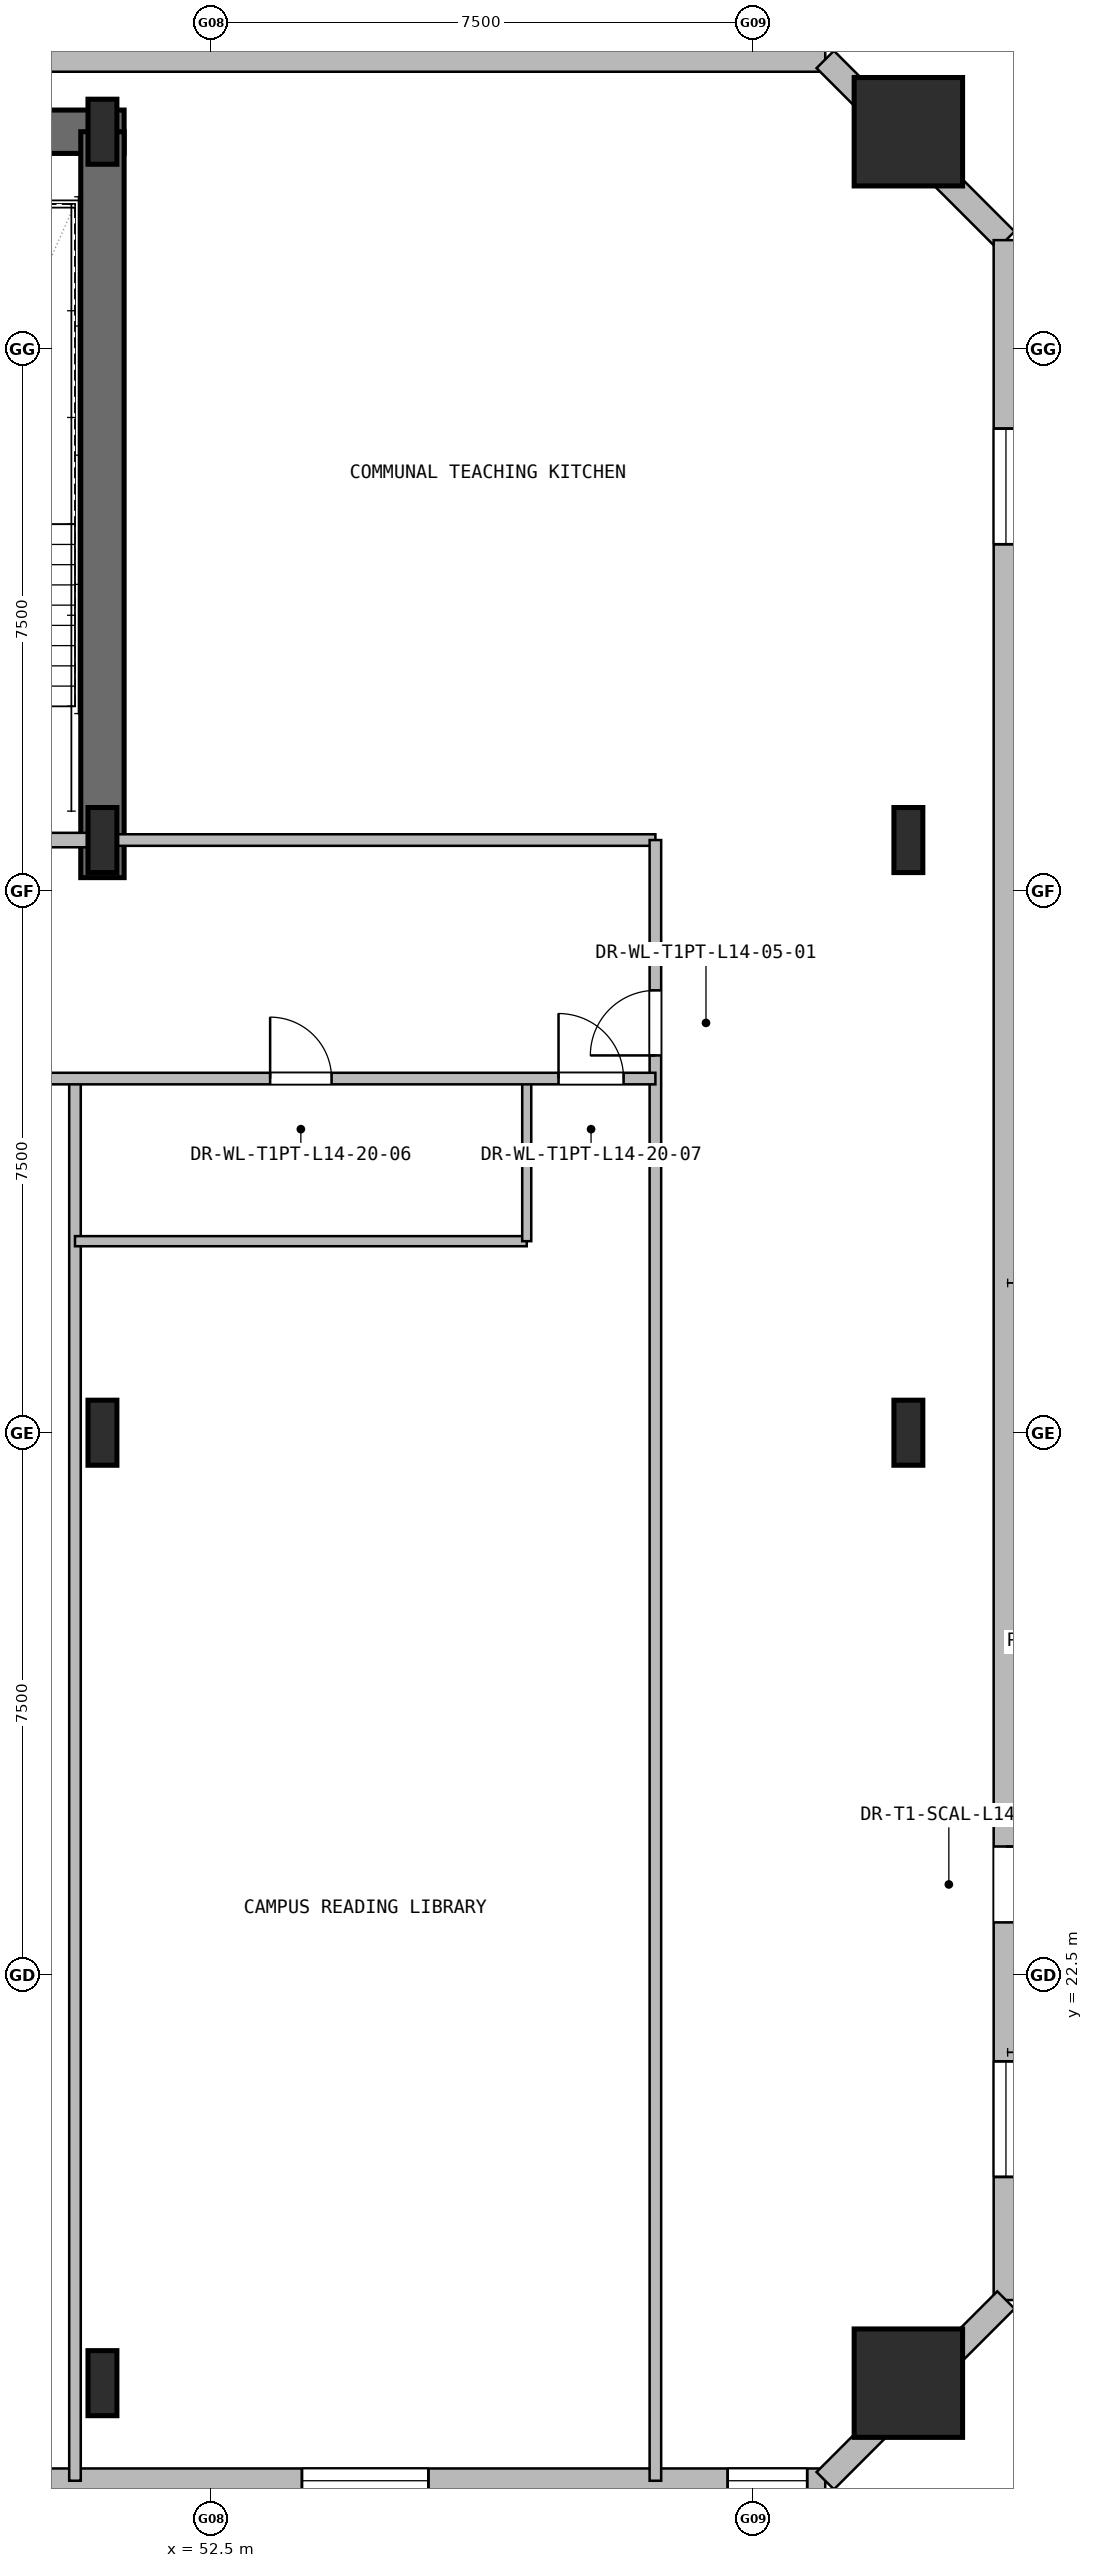
"""IFC4 building model, lengths in metres.
Left out: names, types, materials, properties, quantities, classifications, styles, units other than length and angle.
Written with IfcOpenShell. Run it as: python <this file> out.ifc"""

import sys

from ifc_helpers import new_model, si_unit, direction, frame, frame_2d, origin, origin_2d, place, context, subcontext, project, spatial, rectangle, hollow_rectangle, i_section, extrude, element, fill, save


model = new_model("IFC4")
c1 = context("Model", 3, precision=1e-05, world=origin(), true_north=direction((0.0, 1.0)))
c2 = subcontext(c1, "Body", "Model", "MODEL_VIEW")
j1 = project(units=[si_unit("LENGTHUNIT", "METRE"), si_unit("PLANEANGLEUNIT", "RADIAN")], contexts=[c1])
p1 = place(None, origin())
s1 = spatial("IfcSite", under=j1, at=p1, CompositionType="ELEMENT")
p2 = place(p1, origin())
s2 = spatial("IfcBuilding", under=s1, at=p2, CompositionType="ELEMENT")
p3 = place(p2, frame((0.0, 0.0, 57.0)))
s3 = spatial("IfcBuildingStorey", under=s2, at=p3, CompositionType="ELEMENT", Elevation=57.0)
p4 = place(p3, frame((23.7, 48.0, 0.0), z_axis=(0.0, 0.0, 1.0), x_axis=(1.0, 0.0, 0.0)))
e1 = element("IfcWall", 1, at=p4, inside=s3, PredefinedType="SHEAR", context=c2, shape_type="SweptSolid", body=[
    extrude(rectangle(XDim=27.6, YDim=0.6, at=frame_2d((13.8, 0.0))), origin(), (0.0, 0.0, 1.0), 3.3),
])
p5 = place(p3, frame((51.0, 37.68, 0.0), z_axis=(0.0, 0.0, 1.0), x_axis=(0.0, 1.0, 0.0)))
e2 = element("IfcWall", 2, at=p5, inside=s3, PredefinedType="SHEAR", context=c2, shape_type="SweptSolid", body=[
    extrude(rectangle(XDim=10.32, YDim=0.6, at=frame_2d((5.16, 0.0))), origin(), (0.0, 0.0, 1.0), 3.3),
])
for number, where, z_axis, x_axis in (
    (3, (51.0, 16.85, 0.0), (0.0, 0.0, 1.0), (1.0, 0.0, 0.0)),
    (4, (51.0, 30.0, 0.0), (0.0, 0.0, 1.0), (1.0, 0.0, 0.0)),
    (5, (51.0, 38.2, 0.0), (0.0, 0.0, 1.0), (1.0, 0.0, 0.0)),
    (6, (51.0, 48.0, 0.0), (0.0, 0.0, 1.0), (1.0, 0.0, 0.0)),
):
    element("IfcColumn", number, at=place(p3, frame(where, z_axis=z_axis, x_axis=x_axis)), inside=s3, PredefinedType="COLUMN", context=c2, shape_type="SweptSolid", body=[
        extrude(i_section(OverallWidth=0.4, OverallDepth=0.9, WebThickness=0.02, FlangeThickness=0.036, at=origin_2d()), origin(), (0.0, 0.0, 1.0), 3.3),
    ])
p6 = place(p3, frame((62.15, 16.85, 0.0), z_axis=(0.0, 0.0, 1.0), x_axis=(1.0, 0.0, 0.0)))
e7 = element("IfcColumn", 7, at=p6, inside=s3, PredefinedType="COLUMN", context=c2, shape_type="SweptSolid", body=[
    extrude(hollow_rectangle(XDim=1.5, YDim=1.5, WallThickness=0.04, at=origin_2d()), origin(), (0.0, 0.0, 1.0), 3.3),
])
for number, where, z_axis, x_axis in (
    (8, (62.15, 30.0, 0.0), (0.0, 0.0, 1.0), (1.0, 0.0, 0.0)),
    (9, (62.15, 38.2, 0.0), (0.0, 0.0, 1.0), (1.0, 0.0, 0.0)),
):
    element("IfcColumn", number, at=place(p3, frame(where, z_axis=z_axis, x_axis=x_axis)), inside=s3, PredefinedType="COLUMN", context=c2, shape_type="SweptSolid", body=[
        extrude(i_section(OverallWidth=0.4, OverallDepth=0.9, WebThickness=0.02, FlangeThickness=0.036, at=origin_2d()), origin(), (0.0, 0.0, 1.0), 3.3),
    ])
p7 = place(p3, frame((62.15, 48.0, 0.0), z_axis=(0.0, 0.0, 1.0), x_axis=(1.0, 0.0, 0.0)))
e10 = element("IfcColumn", 10, at=p7, inside=s3, PredefinedType="COLUMN", context=c2, shape_type="SweptSolid", body=[
    extrude(hollow_rectangle(XDim=1.5, YDim=1.5, WallThickness=0.04, at=origin_2d()), origin(), (0.0, 0.0, 1.0), 3.3),
])
p8 = place(p3, frame((61.0, 15.5, 0.0), z_axis=(0.0, 0.0, 1.0), x_axis=(-1.0, 0.0, 0.0)))
e11 = element("IfcWall", 11, at=p8, inside=s3, PredefinedType="SOLIDWALL", context=c2, shape_type="SweptSolid", body=[
    extrude(rectangle(XDim=47.0, YDim=0.34, at=frame_2d((23.5, 0.0))), origin(), (0.0, 0.0, 1.0), 3.03),
])
p9 = place(p8, frame((45.65, 0.0, 0.8)))
e12 = element("IfcOpeningElement", 12, at=p9, cuts=e11, PredefinedType="OPENING", context=c2, shape_type="SweptSolid", body=[
    extrude(rectangle(XDim=1.1, YDim=1.5, at=frame_2d((0.55, 0.75))), frame((0.0, 0.18, 0.0), z_axis=(0.0, -1.0, 0.0), x_axis=(1.0, 0.0, 0.0)), (0.0, 0.0, 1.0), 0.36),
])
p10 = place(p8, frame((0.25, 0.0, 0.8)))
e13 = element("IfcOpeningElement", 13, at=p10, cuts=e11, PredefinedType="OPENING", context=c2, shape_type="SweptSolid", body=[
    extrude(rectangle(XDim=1.1, YDim=1.5, at=frame_2d((0.55, 0.75))), frame((0.0, 0.18, 0.0), z_axis=(0.0, -1.0, 0.0), x_axis=(1.0, 0.0, 0.0)), (0.0, 0.0, 1.0), 0.36),
])
p11 = place(p8, frame((33.896, 0.0, 0.8)))
e14 = element("IfcOpeningElement", 14, at=p11, cuts=e11, PredefinedType="OPENING", context=c2, shape_type="SweptSolid", body=[
    extrude(rectangle(XDim=1.75, YDim=1.8, at=frame_2d((0.875, 0.9))), frame((0.0, 0.18, 0.0), z_axis=(0.0, -1.0, 0.0), x_axis=(1.0, 0.0, 0.0)), (0.0, 0.0, 1.0), 0.36),
])
p12 = place(p8, frame((12.14, 0.0, 0.8)))
e15 = element("IfcOpeningElement", 15, at=p12, cuts=e11, PredefinedType="OPENING", context=c2, shape_type="SweptSolid", body=[
    extrude(rectangle(XDim=1.75, YDim=1.8, at=frame_2d((0.875, 0.9))), frame((0.0, 0.18, 0.0), z_axis=(0.0, -1.0, 0.0), x_axis=(1.0, 0.0, 0.0)), (0.0, 0.0, 1.0), 0.36),
])
p13 = place(p8, frame((5.49, 0.0, 0.8)))
e16 = element("IfcOpeningElement", 16, at=p13, cuts=e11, PredefinedType="OPENING", context=c2, shape_type="SweptSolid", body=[
    extrude(rectangle(XDim=1.75, YDim=1.8, at=frame_2d((0.875, 0.9))), frame((0.0, 0.18, 0.0), z_axis=(0.0, -1.0, 0.0), x_axis=(1.0, 0.0, 0.0)), (0.0, 0.0, 1.0), 0.36),
])
p14 = place(p3, frame((14.0, 49.0, 0.0), z_axis=(0.0, 0.0, 1.0), x_axis=(1.0, 0.0, 0.0)))
e17 = element("IfcWall", 17, at=p14, inside=s3, PredefinedType="SOLIDWALL", context=c2, shape_type="SweptSolid", body=[
    extrude(rectangle(XDim=47.0, YDim=0.34, at=frame_2d((23.5, 0.0))), origin(), (0.0, 0.0, 1.0), 3.03),
])
p15 = place(p3, frame((61.0, 49.0, 0.0), z_axis=(0.0, 0.0, 1.0), x_axis=(0.707106781187, -0.707106781187, 0.0)))
e18 = element("IfcWall", 18, at=p15, inside=s3, PredefinedType="SOLIDWALL", context=c2, shape_type="SweptSolid", body=[
    extrude(rectangle(XDim=3.536, YDim=0.34, at=frame_2d((1.768, 0.0))), origin(), (0.0, 0.0, 1.0), 3.03),
])
p16 = place(p3, frame((63.5, 46.5, 0.0), z_axis=(0.0, 0.0, 1.0), x_axis=(0.0, -1.0, 0.0)))
e19 = element("IfcWall", 19, at=p16, inside=s3, PredefinedType="SOLIDWALL", context=c2, shape_type="SweptSolid", body=[
    extrude(rectangle(XDim=28.5, YDim=0.34, at=frame_2d((14.25, 0.0))), origin(), (0.0, 0.0, 1.0), 3.03),
])
p17 = place(p16, frame((22.225, 0.0, 0.0)))
e20 = element("IfcOpeningElement", 20, at=p17, cuts=e19, PredefinedType="OPENING", context=c2, shape_type="SweptSolid", body=[
    extrude(rectangle(XDim=1.05, YDim=2.1, at=frame_2d((0.525, 1.05))), frame((0.0, 0.18, 0.0), z_axis=(0.0, -1.0, 0.0), x_axis=(1.0, 0.0, 0.0)), (0.0, 0.0, 1.0), 0.36),
])
p18 = place(p16, frame((2.607, 0.0, 0.8)))
e21 = element("IfcOpeningElement", 21, at=p18, cuts=e19, PredefinedType="OPENING", context=c2, shape_type="SweptSolid", body=[
    extrude(rectangle(XDim=1.6, YDim=1.8, at=frame_2d((0.8, 0.9))), frame((0.0, 0.18, 0.0), z_axis=(0.0, -1.0, 0.0), x_axis=(1.0, 0.0, 0.0)), (0.0, 0.0, 1.0), 0.36),
])
p19 = place(p16, frame((25.196, 0.0, 0.8)))
e22 = element("IfcOpeningElement", 22, at=p19, cuts=e19, PredefinedType="OPENING", context=c2, shape_type="SweptSolid", body=[
    extrude(rectangle(XDim=1.6, YDim=1.8, at=frame_2d((0.8, 0.9))), frame((0.0, 0.18, 0.0), z_axis=(0.0, -1.0, 0.0), x_axis=(1.0, 0.0, 0.0)), (0.0, 0.0, 1.0), 0.36),
])
p20 = place(p3, frame((63.5, 18.0, 0.0), z_axis=(0.0, 0.0, 1.0), x_axis=(-0.707106781187, -0.707106781187, 0.0)))
e23 = element("IfcWall", 23, at=p20, inside=s3, PredefinedType="SOLIDWALL", context=c2, shape_type="SweptSolid", body=[
    extrude(rectangle(XDim=3.536, YDim=0.34, at=frame_2d((1.768, 0.0))), origin(), (0.0, 0.0, 1.0), 3.03),
])
p21 = place(p3, frame((47.15, 38.2, 0.0), z_axis=(0.0, 0.0, 1.0), x_axis=(1.0, 0.0, 0.0)))
e24 = element("IfcWall", 24, at=p21, inside=s3, PredefinedType="PARTITIONING", context=c2, shape_type="SweptSolid", body=[
    extrude(rectangle(XDim=3.85, YDim=0.2, at=frame_2d((1.925, 0.0))), origin(), (0.0, 0.0, 1.0), 2.33),
])
p22 = place(p21, frame((0.75, 0.0, 0.0)))
e25 = element("IfcOpeningElement", 25, at=p22, cuts=e24, PredefinedType="OPENING", context=c2, shape_type="SweptSolid", body=[
    extrude(rectangle(XDim=1.12, YDim=2.1, at=frame_2d((0.56, 1.05))), frame((0.0, 0.11, 0.0), z_axis=(0.0, -1.0, 0.0), x_axis=(1.0, 0.0, 0.0)), (0.0, 0.0, 1.0), 0.22),
])
p23 = place(p3, frame((51.0, 38.2, 0.0), z_axis=(0.0, 0.0, 1.0), x_axis=(1.0, 0.0, 0.0)))
e26 = element("IfcWall", 26, at=p23, inside=s3, PredefinedType="PARTITIONING", context=c2, shape_type="SweptSolid", body=[
    extrude(rectangle(XDim=7.65, YDim=0.16, at=frame_2d((3.825, 0.0))), origin(), (0.0, 0.0, 1.0), 2.33),
])
p24 = place(p3, frame((58.65, 15.5, 0.0), z_axis=(0.0, 0.0, 1.0), x_axis=(0.0, 1.0, 0.0)))
e27 = element("IfcWall", 27, at=p24, inside=s3, PredefinedType="PARTITIONING", context=c2, shape_type="SweptSolid", body=[
    extrude(rectangle(XDim=22.7, YDim=0.16, at=frame_2d((11.35, 0.0))), origin(), (0.0, 0.0, 1.0), 3.03),
])
p25 = place(p24, frame((19.72, 0.0, 0.0)))
e28 = element("IfcOpeningElement", 28, at=p25, cuts=e27, PredefinedType="OPENING", context=c2, shape_type="SweptSolid", body=[
    extrude(rectangle(XDim=0.9, YDim=2.05, at=frame_2d((0.45, 1.025))), frame((0.0, 0.09, 0.0), z_axis=(0.0, -1.0, 0.0), x_axis=(1.0, 0.0, 0.0)), (0.0, 0.0, 1.0), 0.18),
])
p26 = place(p3, frame((50.62, 15.5, 0.0), z_axis=(0.0, 0.0, 1.0), x_axis=(0.0, 1.0, 0.0)))
e29 = element("IfcWall", 29, at=p26, inside=s3, PredefinedType="PARTITIONING", context=c2, shape_type="SweptSolid", body=[
    extrude(rectangle(XDim=19.4, YDim=0.16, at=frame_2d((9.7, 0.0))), origin(), (0.0, 0.0, 1.0), 3.03),
])
p27 = place(p3, frame((50.62, 32.65, 0.0), z_axis=(0.0, 0.0, 1.0), x_axis=(1.0, 0.0, 0.0)))
e30 = element("IfcWall", 30, at=p27, inside=s3, PredefinedType="PARTITIONING", context=c2, shape_type="SweptSolid", body=[
    extrude(rectangle(XDim=6.25, YDim=0.14, at=frame_2d((3.125, 0.0))), origin(), (0.0, 0.0, 1.0), 3.03),
])
p28 = place(p3, frame((56.87, 32.65, 0.0), z_axis=(0.0, 0.0, 1.0), x_axis=(0.0, 1.0, 0.0)))
e31 = element("IfcWall", 31, at=p28, inside=s3, PredefinedType="PARTITIONING", context=c2, shape_type="SweptSolid", body=[
    extrude(rectangle(XDim=2.25, YDim=0.125, at=frame_2d((1.125, 0.0))), origin(), (0.0, 0.0, 1.0), 3.03),
])
p29 = place(p3, frame((18.5, 34.9, 0.0), z_axis=(0.0, 0.0, 1.0), x_axis=(1.0, 0.0, 0.0)))
e32 = element("IfcWall", 32, at=p29, inside=s3, PredefinedType="PARTITIONING", context=c2, shape_type="SweptSolid", body=[
    extrude(rectangle(XDim=40.15, YDim=0.16, at=frame_2d((20.075, 0.0))), origin(), (0.0, 0.0, 1.0), 3.03),
])
p30 = place(p29, frame((3.339, 0.0, 0.0)))
e33 = element("IfcOpeningElement", 33, at=p30, cuts=e32, PredefinedType="OPENING", context=c2, shape_type="SweptSolid", body=[
    extrude(rectangle(XDim=0.95, YDim=2.1, at=frame_2d((0.475, 1.05))), frame((0.0, 0.09, 0.0), z_axis=(0.0, -1.0, 0.0), x_axis=(1.0, 0.0, 0.0)), (0.0, 0.0, 1.0), 0.18),
])
p31 = place(p29, frame((11.193, 0.0, 0.0)))
e34 = element("IfcOpeningElement", 34, at=p31, cuts=e32, PredefinedType="OPENING", context=c2, shape_type="SweptSolid", body=[
    extrude(rectangle(XDim=0.9, YDim=2.05, at=frame_2d((0.45, 1.025))), frame((0.0, 0.09, 0.0), z_axis=(0.0, -1.0, 0.0), x_axis=(1.0, 0.0, 0.0)), (0.0, 0.0, 1.0), 0.18),
])
p32 = place(p29, frame((19.424, 0.0, 0.0)))
e35 = element("IfcOpeningElement", 35, at=p32, cuts=e32, PredefinedType="OPENING", context=c2, shape_type="SweptSolid", body=[
    extrude(rectangle(XDim=0.9, YDim=2.05, at=frame_2d((0.45, 1.025))), frame((0.0, 0.09, 0.0), z_axis=(0.0, -1.0, 0.0), x_axis=(1.0, 0.0, 0.0)), (0.0, 0.0, 1.0), 0.18),
])
p33 = place(p29, frame((24.89, 0.0, 0.0)))
e36 = element("IfcOpeningElement", 36, at=p33, cuts=e32, PredefinedType="OPENING", context=c2, shape_type="SweptSolid", body=[
    extrude(rectangle(XDim=0.85, YDim=2.05, at=frame_2d((0.425, 1.025))), frame((0.0, 0.09, 0.0), z_axis=(0.0, -1.0, 0.0), x_axis=(1.0, 0.0, 0.0)), (0.0, 0.0, 1.0), 0.18),
])
p34 = place(p29, frame((28.88, 0.0, 0.0)))
e37 = element("IfcOpeningElement", 37, at=p34, cuts=e32, PredefinedType="OPENING", context=c2, shape_type="SweptSolid", body=[
    extrude(rectangle(XDim=0.9, YDim=2.05, at=frame_2d((0.45, 1.025))), frame((0.0, 0.09, 0.0), z_axis=(0.0, -1.0, 0.0), x_axis=(1.0, 0.0, 0.0)), (0.0, 0.0, 1.0), 0.18),
])
p35 = place(p29, frame((34.82, 0.0, 0.0)))
e38 = element("IfcOpeningElement", 38, at=p35, cuts=e32, PredefinedType="OPENING", context=c2, shape_type="SweptSolid", body=[
    extrude(rectangle(XDim=0.85, YDim=2.05, at=frame_2d((0.425, 1.025))), frame((0.0, 0.09, 0.0), z_axis=(0.0, -1.0, 0.0), x_axis=(1.0, 0.0, 0.0)), (0.0, 0.0, 1.0), 0.18),
])
p36 = place(p29, frame((38.81, 0.0, 0.0)))
e39 = element("IfcOpeningElement", 39, at=p36, cuts=e32, PredefinedType="OPENING", context=c2, shape_type="SweptSolid", body=[
    extrude(rectangle(XDim=0.9, YDim=2.05, at=frame_2d((0.45, 1.025))), frame((0.0, 0.09, 0.0), z_axis=(0.0, -1.0, 0.0), x_axis=(1.0, 0.0, 0.0)), (0.0, 0.0, 1.0), 0.18),
])
p37 = place(p10, origin())
e40 = element("IfcWindow", 40, at=p37, inside=s3, PartitioningType="SINGLE_PANEL", PredefinedType="WINDOW", context=c2, shape_type="SweptSolid", body=[
    extrude(rectangle(XDim=1.1, YDim=1.5, at=frame_2d((0.55, 0.75))), frame((0.0, 0.03, 0.0), z_axis=(0.0, -1.0, 0.0), x_axis=(1.0, 0.0, 0.0)), (0.0, 0.0, 1.0), 0.06),
])
fill(e13, e40)
p38 = place(p13, origin())
e41 = element("IfcWindow", 41, at=p38, inside=s3, PartitioningType="SINGLE_PANEL", PredefinedType="WINDOW", context=c2, shape_type="SweptSolid", body=[
    extrude(rectangle(XDim=1.75, YDim=1.8, at=frame_2d((0.875, 0.9))), frame((0.0, 0.03, 0.0), z_axis=(0.0, -1.0, 0.0), x_axis=(1.0, 0.0, 0.0)), (0.0, 0.0, 1.0), 0.06),
])
fill(e16, e41)
p39 = place(p17, origin())
e42 = element("IfcDoor", 42, at=p39, inside=s3, OperationType="SINGLE_SWING_LEFT", PredefinedType="DOOR", context=c2, shape_type="SweptSolid", body=[
    extrude(rectangle(XDim=1.05, YDim=2.1, at=frame_2d((0.525, 1.05))), frame((0.0, 0.025, 0.0), z_axis=(0.0, -1.0, 0.0), x_axis=(1.0, 0.0, 0.0)), (0.0, 0.0, 1.0), 0.05),
])
fill(e20, e42)
p40 = place(p18, origin())
e43 = element("IfcWindow", 43, at=p40, inside=s3, PartitioningType="SINGLE_PANEL", PredefinedType="WINDOW", context=c2, shape_type="SweptSolid", body=[
    extrude(rectangle(XDim=1.6, YDim=1.8, at=frame_2d((0.8, 0.9))), frame((0.0, 0.03, 0.0), z_axis=(0.0, -1.0, 0.0), x_axis=(1.0, 0.0, 0.0)), (0.0, 0.0, 1.0), 0.06),
])
fill(e21, e43)
p41 = place(p19, origin())
e44 = element("IfcWindow", 44, at=p41, inside=s3, PartitioningType="SINGLE_PANEL", PredefinedType="WINDOW", context=c2, shape_type="SweptSolid", body=[
    extrude(rectangle(XDim=1.6, YDim=1.8, at=frame_2d((0.8, 0.9))), frame((0.0, 0.03, 0.0), z_axis=(0.0, -1.0, 0.0), x_axis=(1.0, 0.0, 0.0)), (0.0, 0.0, 1.0), 0.06),
])
fill(e22, e44)
p42 = place(p25, origin())
e45 = element("IfcDoor", 45, at=p42, inside=s3, OperationType="SINGLE_SWING_LEFT", PredefinedType="DOOR", context=c2, shape_type="SweptSolid", body=[
    extrude(rectangle(XDim=0.9, YDim=2.05, at=frame_2d((0.45, 1.025))), frame((0.0, 0.025, 0.0), z_axis=(0.0, -1.0, 0.0), x_axis=(1.0, 0.0, 0.0)), (0.0, 0.0, 1.0), 0.05),
])
fill(e28, e45)
p43 = place(p35, origin())
e46 = element("IfcDoor", 46, at=p43, inside=s3, OperationType="SINGLE_SWING_LEFT", PredefinedType="DOOR", context=c2, shape_type="SweptSolid", body=[
    extrude(rectangle(XDim=0.85, YDim=2.05, at=frame_2d((0.425, 1.025))), frame((0.0, 0.025, 0.0), z_axis=(0.0, -1.0, 0.0), x_axis=(1.0, 0.0, 0.0)), (0.0, 0.0, 1.0), 0.05),
])
fill(e38, e46)
p44 = place(p36, origin())
e47 = element("IfcDoor", 47, at=p44, inside=s3, OperationType="SINGLE_SWING_RIGHT", PredefinedType="DOOR", context=c2, shape_type="SweptSolid", body=[
    extrude(rectangle(XDim=0.9, YDim=2.05, at=frame_2d((0.45, 1.025))), frame((0.0, 0.025, 0.0), z_axis=(0.0, -1.0, 0.0), x_axis=(1.0, 0.0, 0.0)), (0.0, 0.0, 1.0), 0.05),
])
fill(e39, e47)
save(model, sys.argv[1])
